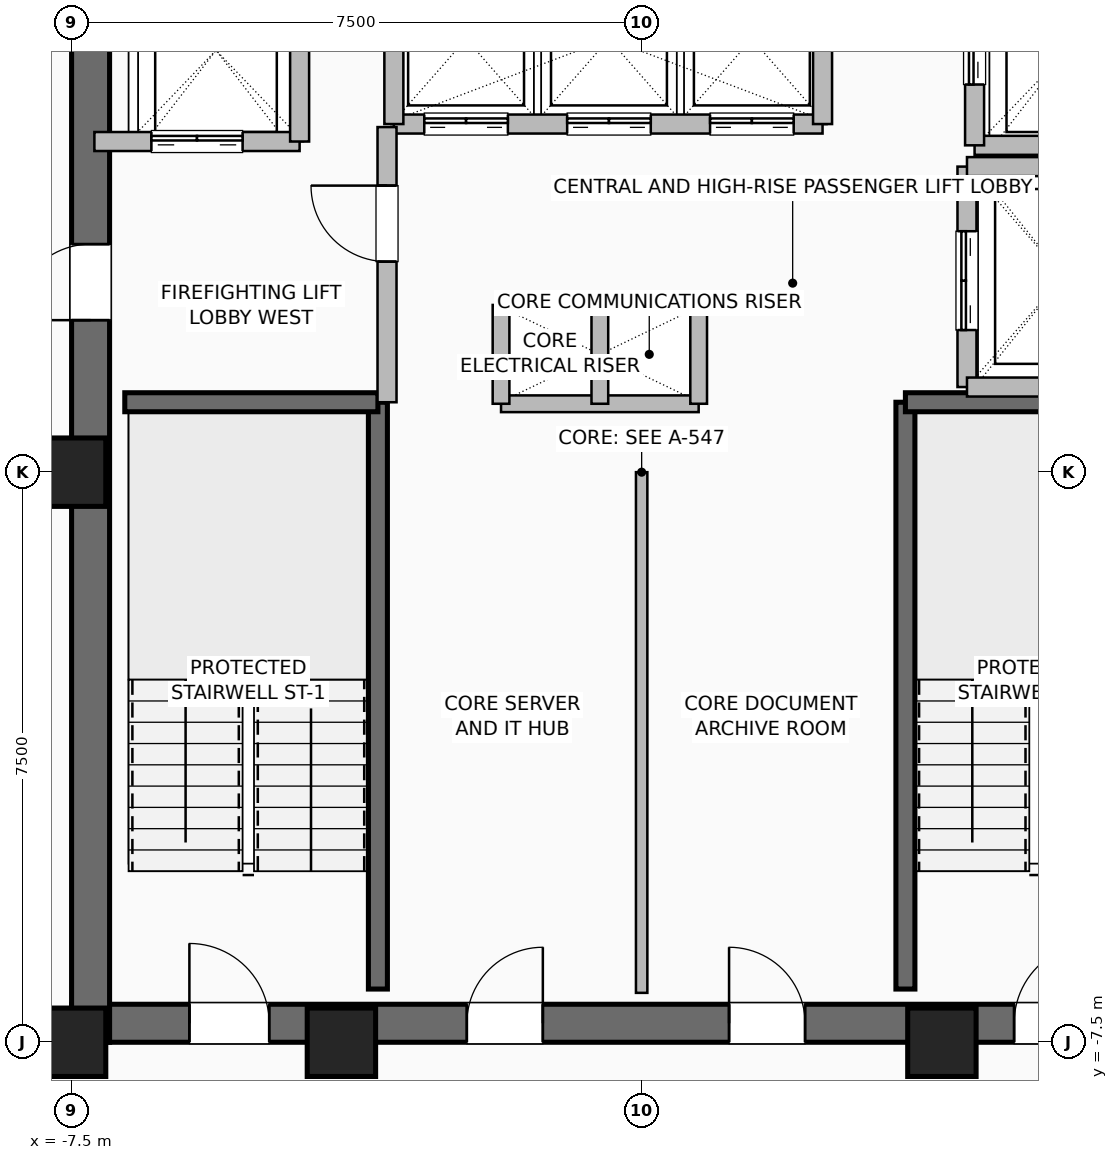
"""IFC4 building model, lengths in metres.
Left out: names, types, materials, properties, quantities, classifications, styles, units other than length and angle.
Written with IfcOpenShell. Run it as: python <this file> out.ifc"""

import sys

from ifc_helpers import new_model, si_unit, direction, frame, frame_2d, origin, origin_2d, place, context, subcontext, project, spatial, rectangle, hollow_rectangle, extrude, element, fill, save


model = new_model("IFC4")
c1 = context("Model", 3, precision=1e-05, world=origin(), true_north=direction((0.0, 1.0)))
c2 = subcontext(c1, "Body", "Model", "MODEL_VIEW")
j1 = project(units=[si_unit("LENGTHUNIT", "METRE"), si_unit("PLANEANGLEUNIT", "RADIAN")], contexts=[c1])
p1 = place(None, origin())
s1 = spatial("IfcSite", under=j1, at=p1, CompositionType="ELEMENT")
p2 = place(p1, origin())
s2 = spatial("IfcBuilding", under=s1, at=p2, CompositionType="ELEMENT")
p3 = place(p2, frame((0.0, 0.0, 180.6)))
s3 = spatial("IfcBuildingStorey", under=s2, at=p3, CompositionType="ELEMENT", Elevation=180.6)
for number, where, z_axis, x_axis in (
    (1, (-7.5, -7.5, 0.0), (0.0, 0.0, 1.0), (1.0, 0.0, 0.0)),
    (2, (-3.95, -7.5, 0.0), (0.0, 0.0, 1.0), (1.0, 0.0, 0.0)),
    (3, (3.95, -7.5, 0.0), (0.0, 0.0, 1.0), (1.0, 0.0, 0.0)),
    (4, (-7.5, 0.0, 0.0), (0.0, 0.0, 1.0), (1.0, 0.0, 0.0)),
):
    element("IfcColumn", number, at=place(p3, frame(where, z_axis=z_axis, x_axis=x_axis)), inside=s3, PredefinedType="COLUMN", context=c2, shape_type="SweptSolid", body=[
        extrude(hollow_rectangle(XDim=0.9, YDim=0.9, WallThickness=0.045, at=origin_2d()), origin(), (0.0, 0.0, 1.0), 3.6),
    ])
p4 = place(p3, frame((-7.5, -7.25, 0.0), z_axis=(0.0, 0.0, 1.0), x_axis=(1.0, 0.0, 0.0)))
e5 = element("IfcWall", 5, at=p4, inside=s3, PredefinedType="SHEAR", context=c2, shape_type="SweptSolid", body=[
    extrude(rectangle(XDim=15.0, YDim=0.5, at=frame_2d((7.5, 0.0))), origin(), (0.0, 0.0, 1.0), 3.36),
])
p5 = place(p4, frame((1.55, 0.0, 0.0)))
e6 = element("IfcOpeningElement", 6, at=p5, cuts=e5, PredefinedType="OPENING", context=c2, shape_type="SweptSolid", body=[
    extrude(rectangle(XDim=1.05, YDim=2.08, at=frame_2d((0.525, 1.04))), frame((0.0, 0.26, 0.0), z_axis=(0.0, -1.0, 0.0), x_axis=(1.0, 0.0, 0.0)), (0.0, 0.0, 1.0), 0.52),
])
p6 = place(p4, frame((12.4, 0.0, 0.0)))
e7 = element("IfcOpeningElement", 7, at=p6, cuts=e5, PredefinedType="OPENING", context=c2, shape_type="SweptSolid", body=[
    extrude(rectangle(XDim=1.05, YDim=2.08, at=frame_2d((0.525, 1.04))), frame((0.0, 0.26, 0.0), z_axis=(0.0, -1.0, 0.0), x_axis=(1.0, 0.0, 0.0)), (0.0, 0.0, 1.0), 0.52),
])
p7 = place(p4, frame((5.2, 0.0, 0.0)))
e8 = element("IfcOpeningElement", 8, at=p7, cuts=e5, PredefinedType="OPENING", context=c2, shape_type="SweptSolid", body=[
    extrude(rectangle(XDim=1.0, YDim=2.08, at=frame_2d((0.5, 1.04))), frame((0.0, 0.26, 0.0), z_axis=(0.0, -1.0, 0.0), x_axis=(1.0, 0.0, 0.0)), (0.0, 0.0, 1.0), 0.52),
])
p8 = place(p4, frame((8.65, 0.0, 0.0)))
e9 = element("IfcOpeningElement", 9, at=p8, cuts=e5, PredefinedType="OPENING", context=c2, shape_type="SweptSolid", body=[
    extrude(rectangle(XDim=1.0, YDim=2.08, at=frame_2d((0.5, 1.04))), frame((0.0, 0.26, 0.0), z_axis=(0.0, -1.0, 0.0), x_axis=(1.0, 0.0, 0.0)), (0.0, 0.0, 1.0), 0.52),
])
p9 = place(p3, frame((-7.25, -7.5, 0.0), z_axis=(0.0, 0.0, 1.0), x_axis=(0.0, 1.0, 0.0)))
e10 = element("IfcWall", 10, at=p9, inside=s3, PredefinedType="SHEAR", context=c2, shape_type="SweptSolid", body=[
    extrude(rectangle(XDim=15.0, YDim=0.5, at=frame_2d((7.5, 0.0))), origin(), (0.0, 0.0, 1.0), 3.36),
])
p10 = place(p9, frame((9.5, 0.0, 0.0)))
e11 = element("IfcOpeningElement", 11, at=p10, cuts=e10, PredefinedType="OPENING", context=c2, shape_type="SweptSolid", body=[
    extrude(rectangle(XDim=1.0, YDim=2.08, at=frame_2d((0.5, 1.04))), frame((0.0, 0.26, 0.0), z_axis=(0.0, -1.0, 0.0), x_axis=(1.0, 0.0, 0.0)), (0.0, 0.0, 1.0), 0.52),
])
p11 = place(p3, frame((-3.47, -6.8, 0.0), z_axis=(0.0, 0.0, 1.0), x_axis=(0.0, 1.0, 0.0)))
e12 = element("IfcWall", 12, at=p11, inside=s3, PredefinedType="SHEAR", context=c2, shape_type="SweptSolid", body=[
    extrude(rectangle(XDim=7.72, YDim=0.25, at=frame_2d((3.86, 0.0))), origin(), (0.0, 0.0, 1.0), 3.36),
])
p12 = place(p3, frame((-6.8, 0.92, 0.0), z_axis=(0.0, 0.0, 1.0), x_axis=(1.0, 0.0, 0.0)))
e13 = element("IfcWall", 13, at=p12, inside=s3, PredefinedType="SHEAR", context=c2, shape_type="SweptSolid", body=[
    extrude(rectangle(XDim=3.33, YDim=0.25, at=frame_2d((1.665, 0.0))), origin(), (0.0, 0.0, 1.0), 3.36),
])
p13 = place(p3, frame((3.47, -6.8, 0.0), z_axis=(0.0, 0.0, 1.0), x_axis=(0.0, 1.0, 0.0)))
e14 = element("IfcWall", 14, at=p13, inside=s3, PredefinedType="SHEAR", context=c2, shape_type="SweptSolid", body=[
    extrude(rectangle(XDim=7.72, YDim=0.25, at=frame_2d((3.86, 0.0))), origin(), (0.0, 0.0, 1.0), 3.36),
])
p14 = place(p3, frame((3.47, 0.92, 0.0), z_axis=(0.0, 0.0, 1.0), x_axis=(1.0, 0.0, 0.0)))
e15 = element("IfcWall", 15, at=p14, inside=s3, PredefinedType="SHEAR", context=c2, shape_type="SweptSolid", body=[
    extrude(rectangle(XDim=3.33, YDim=0.25, at=frame_2d((1.665, 0.0))), origin(), (0.0, 0.0, 1.0), 3.36),
])
for number, where, z_axis, x_axis in (
    (16, (-1.85, 2.2, 0.0), (0.0, 0.0, 1.0), (1.0, 0.0, 0.0)),
    (17, (-1.85, 0.9, 0.0), (0.0, 0.0, 1.0), (1.0, 0.0, 0.0)),
):
    element("IfcWall", number, at=place(p3, frame(where, z_axis=z_axis, x_axis=x_axis)), inside=s3, PredefinedType="PARTITIONING", context=c2, shape_type="SweptSolid", body=[
        extrude(rectangle(XDim=2.6, YDim=0.22, at=frame_2d((1.3, 0.0))), origin(), (0.0, 0.0, 1.0), 3.36),
    ])
for number, where, z_axis, x_axis in (
    (18, (-0.55, 0.9, 0.0), (0.0, 0.0, 1.0), (0.0, 1.0, 0.0)),
    (19, (0.75, 0.9, 0.0), (0.0, 0.0, 1.0), (0.0, 1.0, 0.0)),
    (20, (-1.85, 0.9, 0.0), (0.0, 0.0, 1.0), (0.0, 1.0, 0.0)),
):
    element("IfcWall", number, at=place(p3, frame(where, z_axis=z_axis, x_axis=x_axis)), inside=s3, PredefinedType="PARTITIONING", context=c2, shape_type="SweptSolid", body=[
        extrude(rectangle(XDim=1.3, YDim=0.22, at=frame_2d((0.65, 0.0))), origin(), (0.0, 0.0, 1.0), 3.36),
    ])
p15 = place(p3, frame((-3.26, 4.58, 0.0), z_axis=(0.0, 0.0, 1.0), x_axis=(1.0, 0.0, 0.0)))
e21 = element("IfcWall", 21, at=p15, inside=s3, PredefinedType="SHEAR", context=c2, shape_type="SweptSolid", body=[
    extrude(rectangle(XDim=5.64, YDim=0.25, at=frame_2d((2.82, 0.0))), origin(), (0.0, 0.0, 1.0), 3.36),
])
p16 = place(p15, frame((0.4, 0.0, 0.0)))
e22 = element("IfcOpeningElement", 22, at=p16, cuts=e21, PredefinedType="OPENING", context=c2, shape_type="SweptSolid", body=[
    extrude(rectangle(XDim=1.1, YDim=2.2, at=frame_2d((0.55, 1.1))), frame((0.0, 0.135, 0.0), z_axis=(0.0, -1.0, 0.0), x_axis=(1.0, 0.0, 0.0)), (0.0, 0.0, 1.0), 0.27),
])
p17 = place(p15, frame((2.28, 0.0, 0.0)))
e23 = element("IfcOpeningElement", 23, at=p17, cuts=e21, PredefinedType="OPENING", context=c2, shape_type="SweptSolid", body=[
    extrude(rectangle(XDim=1.1, YDim=2.2, at=frame_2d((0.55, 1.1))), frame((0.0, 0.135, 0.0), z_axis=(0.0, -1.0, 0.0), x_axis=(1.0, 0.0, 0.0)), (0.0, 0.0, 1.0), 0.27),
])
p18 = place(p15, frame((4.16, 0.0, 0.0)))
e24 = element("IfcOpeningElement", 24, at=p18, cuts=e21, PredefinedType="OPENING", context=c2, shape_type="SweptSolid", body=[
    extrude(rectangle(XDim=1.1, YDim=2.2, at=frame_2d((0.55, 1.1))), frame((0.0, 0.135, 0.0), z_axis=(0.0, -1.0, 0.0), x_axis=(1.0, 0.0, 0.0)), (0.0, 0.0, 1.0), 0.27),
])
for number, where, z_axis, x_axis in (
    (25, (-3.26, 4.58, 0.0), (0.0, 0.0, 1.0), (0.0, 1.0, 0.0)),
    (26, (2.38, 4.58, 0.0), (0.0, 0.0, 1.0), (0.0, 1.0, 0.0)),
):
    element("IfcWall", number, at=place(p3, frame(where, z_axis=z_axis, x_axis=x_axis)), inside=s3, PredefinedType="SHEAR", context=c2, shape_type="SweptSolid", body=[
        extrude(rectangle(XDim=2.22, YDim=0.25, at=frame_2d((1.11, 0.0))), origin(), (0.0, 0.0, 1.0), 3.36),
    ])
p19 = place(p3, frame((-7.2, 4.35, 0.0), z_axis=(0.0, 0.0, 1.0), x_axis=(1.0, 0.0, 0.0)))
e27 = element("IfcWall", 27, at=p19, inside=s3, PredefinedType="SHEAR", context=c2, shape_type="SweptSolid", body=[
    extrude(rectangle(XDim=2.7, YDim=0.25, at=frame_2d((1.35, 0.0))), origin(), (0.0, 0.0, 1.0), 3.36),
])
p20 = place(p19, frame((0.75, 0.0, 0.0)))
e28 = element("IfcOpeningElement", 28, at=p20, cuts=e27, PredefinedType="OPENING", context=c2, shape_type="SweptSolid", body=[
    extrude(rectangle(XDim=1.2, YDim=2.2, at=frame_2d((0.6, 1.1))), frame((0.0, 0.135, 0.0), z_axis=(0.0, -1.0, 0.0), x_axis=(1.0, 0.0, 0.0)), (0.0, 0.0, 1.0), 0.27),
])
p21 = place(p3, frame((-4.5, 4.35, 0.0), z_axis=(0.0, 0.0, 1.0), x_axis=(0.0, 1.0, 0.0)))
e29 = element("IfcWall", 29, at=p21, inside=s3, PredefinedType="SHEAR", context=c2, shape_type="SweptSolid", body=[
    extrude(rectangle(XDim=2.85, YDim=0.25, at=frame_2d((1.425, 0.0))), origin(), (0.0, 0.0, 1.0), 3.36),
])
p22 = place(p3, frame((4.38, 4.3, 0.0), z_axis=(0.0, 0.0, 1.0), x_axis=(1.0, 0.0, 0.0)))
e30 = element("IfcWall", 30, at=p22, inside=s3, PredefinedType="SHEAR", context=c2, shape_type="SweptSolid", body=[
    extrude(rectangle(XDim=2.42, YDim=0.25, at=frame_2d((1.21, 0.0))), origin(), (0.0, 0.0, 1.0), 3.36),
])
p23 = place(p3, frame((4.38, 4.3, 0.0), z_axis=(0.0, 0.0, 1.0), x_axis=(0.0, 1.0, 0.0)))
e31 = element("IfcWall", 31, at=p23, inside=s3, PredefinedType="SHEAR", context=c2, shape_type="SweptSolid", body=[
    extrude(rectangle(XDim=2.5, YDim=0.25, at=frame_2d((1.25, 0.0))), origin(), (0.0, 0.0, 1.0), 3.36),
])
p24 = place(p23, frame((0.8, 0.0, 0.0)))
e32 = element("IfcOpeningElement", 32, at=p24, cuts=e31, PredefinedType="OPENING", context=c2, shape_type="SweptSolid", body=[
    extrude(rectangle(XDim=1.2, YDim=2.2, at=frame_2d((0.6, 1.1))), frame((0.0, 0.135, 0.0), z_axis=(0.0, -1.0, 0.0), x_axis=(1.0, 0.0, 0.0)), (0.0, 0.0, 1.0), 0.27),
])
p25 = place(p3, frame((4.28, 1.12, 0.0), z_axis=(0.0, 0.0, 1.0), x_axis=(0.0, 1.0, 0.0)))
e33 = element("IfcWall", 33, at=p25, inside=s3, PredefinedType="SHEAR", context=c2, shape_type="SweptSolid", body=[
    extrude(rectangle(XDim=2.9, YDim=0.25, at=frame_2d((1.45, 0.0))), origin(), (0.0, 0.0, 1.0), 3.36),
])
p26 = place(p25, frame((0.75, 0.0, 0.0)))
e34 = element("IfcOpeningElement", 34, at=p26, cuts=e33, PredefinedType="OPENING", context=c2, shape_type="SweptSolid", body=[
    extrude(rectangle(XDim=1.3, YDim=2.3, at=frame_2d((0.65, 1.15))), frame((0.0, 0.135, 0.0), z_axis=(0.0, -1.0, 0.0), x_axis=(1.0, 0.0, 0.0)), (0.0, 0.0, 1.0), 0.27),
])
for number, where, z_axis, x_axis in (
    (35, (4.28, 1.12, 0.0), (0.0, 0.0, 1.0), (1.0, 0.0, 0.0)),
    (36, (4.28, 4.02, 0.0), (0.0, 0.0, 1.0), (1.0, 0.0, 0.0)),
):
    element("IfcWall", number, at=place(p3, frame(where, z_axis=z_axis, x_axis=x_axis)), inside=s3, PredefinedType="SHEAR", context=c2, shape_type="SweptSolid", body=[
        extrude(rectangle(XDim=2.52, YDim=0.25, at=frame_2d((1.26, 0.0))), origin(), (0.0, 0.0, 1.0), 3.36),
    ])
p27 = place(p3, frame((-3.35, 0.92, 0.0), z_axis=(0.0, 0.0, 1.0), x_axis=(0.0, 1.0, 0.0)))
e37 = element("IfcWall", 37, at=p27, inside=s3, PredefinedType="SHEAR", context=c2, shape_type="SweptSolid", body=[
    extrude(rectangle(XDim=3.62, YDim=0.25, at=frame_2d((1.81, 0.0))), origin(), (0.0, 0.0, 1.0), 3.36),
])
p28 = place(p27, frame((1.85, 0.0, 0.0)))
e38 = element("IfcOpeningElement", 38, at=p28, cuts=e37, PredefinedType="OPENING", context=c2, shape_type="SweptSolid", body=[
    extrude(rectangle(XDim=1.0, YDim=2.08, at=frame_2d((0.5, 1.04))), frame((0.0, 0.135, 0.0), z_axis=(0.0, -1.0, 0.0), x_axis=(1.0, 0.0, 0.0)), (0.0, 0.0, 1.0), 0.27),
])
p29 = place(p3, frame((0.0, -6.85, 0.0), z_axis=(0.0, 0.0, 1.0), x_axis=(0.0, 1.0, 0.0)))
e39 = element("IfcWall", 39, at=p29, inside=s3, PredefinedType="PARTITIONING", context=c2, shape_type="SweptSolid", body=[
    extrude(rectangle(XDim=6.85, YDim=0.15, at=frame_2d((3.425, 0.0))), origin(), (0.0, 0.0, 1.0), 3.36),
])
p30 = place(p5, origin())
e40 = element("IfcDoor", 40, at=p30, inside=s3, OperationType="SINGLE_SWING_LEFT", PredefinedType="DOOR", context=c2, shape_type="SweptSolid", body=[
    extrude(rectangle(XDim=1.05, YDim=2.08, at=frame_2d((0.525, 1.04))), frame((0.0, 0.025, 0.0), z_axis=(0.0, -1.0, 0.0), x_axis=(1.0, 0.0, 0.0)), (0.0, 0.0, 1.0), 0.05),
])
fill(e6, e40)
p31 = place(p6, origin())
e41 = element("IfcDoor", 41, at=p31, inside=s3, OperationType="SINGLE_SWING_RIGHT", PredefinedType="DOOR", context=c2, shape_type="SweptSolid", body=[
    extrude(rectangle(XDim=1.05, YDim=2.08, at=frame_2d((0.525, 1.04))), frame((0.0, 0.025, 0.0), z_axis=(0.0, -1.0, 0.0), x_axis=(1.0, 0.0, 0.0)), (0.0, 0.0, 1.0), 0.05),
])
fill(e7, e41)
p32 = place(p10, origin())
e42 = element("IfcDoor", 42, at=p32, inside=s3, OperationType="SINGLE_SWING_LEFT", PredefinedType="DOOR", context=c2, shape_type="SweptSolid", body=[
    extrude(rectangle(XDim=1.0, YDim=2.08, at=frame_2d((0.5, 1.04))), frame((0.0, 0.025, 0.0), z_axis=(0.0, -1.0, 0.0), x_axis=(1.0, 0.0, 0.0)), (0.0, 0.0, 1.0), 0.05),
])
fill(e11, e42)
p33 = place(p7, origin())
e43 = element("IfcDoor", 43, at=p33, inside=s3, OperationType="SINGLE_SWING_RIGHT", PredefinedType="DOOR", context=c2, shape_type="SweptSolid", body=[
    extrude(rectangle(XDim=1.0, YDim=2.08, at=frame_2d((0.5, 1.04))), frame((0.0, 0.025, 0.0), z_axis=(0.0, -1.0, 0.0), x_axis=(1.0, 0.0, 0.0)), (0.0, 0.0, 1.0), 0.05),
])
fill(e8, e43)
p34 = place(p8, origin())
e44 = element("IfcDoor", 44, at=p34, inside=s3, OperationType="SINGLE_SWING_LEFT", PredefinedType="DOOR", context=c2, shape_type="SweptSolid", body=[
    extrude(rectangle(XDim=1.0, YDim=2.08, at=frame_2d((0.5, 1.04))), frame((0.0, 0.025, 0.0), z_axis=(0.0, -1.0, 0.0), x_axis=(1.0, 0.0, 0.0)), (0.0, 0.0, 1.0), 0.05),
])
fill(e9, e44)
p35 = place(p16, origin())
e45 = element("IfcDoor", 45, at=p35, inside=s3, OperationType="DOUBLE_DOOR_SLIDING", PredefinedType="DOOR", context=c2, shape_type="SweptSolid", body=[
    extrude(rectangle(XDim=1.1, YDim=2.2, at=frame_2d((0.55, 1.1))), frame((0.0, 0.025, 0.0), z_axis=(0.0, -1.0, 0.0), x_axis=(1.0, 0.0, 0.0)), (0.0, 0.0, 1.0), 0.05),
])
fill(e22, e45)
p36 = place(p17, origin())
e46 = element("IfcDoor", 46, at=p36, inside=s3, OperationType="DOUBLE_DOOR_SLIDING", PredefinedType="DOOR", context=c2, shape_type="SweptSolid", body=[
    extrude(rectangle(XDim=1.1, YDim=2.2, at=frame_2d((0.55, 1.1))), frame((0.0, 0.025, 0.0), z_axis=(0.0, -1.0, 0.0), x_axis=(1.0, 0.0, 0.0)), (0.0, 0.0, 1.0), 0.05),
])
fill(e23, e46)
p37 = place(p18, origin())
e47 = element("IfcDoor", 47, at=p37, inside=s3, OperationType="DOUBLE_DOOR_SLIDING", PredefinedType="DOOR", context=c2, shape_type="SweptSolid", body=[
    extrude(rectangle(XDim=1.1, YDim=2.2, at=frame_2d((0.55, 1.1))), frame((0.0, 0.025, 0.0), z_axis=(0.0, -1.0, 0.0), x_axis=(1.0, 0.0, 0.0)), (0.0, 0.0, 1.0), 0.05),
])
fill(e24, e47)
p38 = place(p20, origin())
e48 = element("IfcDoor", 48, at=p38, inside=s3, OperationType="DOUBLE_DOOR_SLIDING", PredefinedType="DOOR", context=c2, shape_type="SweptSolid", body=[
    extrude(rectangle(XDim=1.2, YDim=2.2, at=frame_2d((0.6, 1.1))), frame((0.0, 0.025, 0.0), z_axis=(0.0, -1.0, 0.0), x_axis=(1.0, 0.0, 0.0)), (0.0, 0.0, 1.0), 0.05),
])
fill(e28, e48)
p39 = place(p24, origin())
e49 = element("IfcDoor", 49, at=p39, inside=s3, OperationType="DOUBLE_DOOR_SLIDING", PredefinedType="DOOR", context=c2, shape_type="SweptSolid", body=[
    extrude(rectangle(XDim=1.2, YDim=2.2, at=frame_2d((0.6, 1.1))), frame((0.0, 0.025, 0.0), z_axis=(0.0, -1.0, 0.0), x_axis=(1.0, 0.0, 0.0)), (0.0, 0.0, 1.0), 0.05),
])
fill(e32, e49)
p40 = place(p26, origin())
e50 = element("IfcDoor", 50, at=p40, inside=s3, OperationType="DOUBLE_DOOR_SLIDING", PredefinedType="DOOR", context=c2, shape_type="SweptSolid", body=[
    extrude(rectangle(XDim=1.3, YDim=2.3, at=frame_2d((0.65, 1.15))), frame((0.0, 0.025, 0.0), z_axis=(0.0, -1.0, 0.0), x_axis=(1.0, 0.0, 0.0)), (0.0, 0.0, 1.0), 0.05),
])
fill(e34, e50)
p41 = place(p28, origin())
e51 = element("IfcDoor", 51, at=p41, inside=s3, OperationType="SINGLE_SWING_RIGHT", PredefinedType="DOOR", context=c2, shape_type="SweptSolid", body=[
    extrude(rectangle(XDim=1.0, YDim=2.08, at=frame_2d((0.5, 1.04))), frame((0.0, 0.025, 0.0), z_axis=(0.0, -1.0, 0.0), x_axis=(1.0, 0.0, 0.0)), (0.0, 0.0, 1.0), 0.05),
])
fill(e38, e51)
save(model, sys.argv[1])
